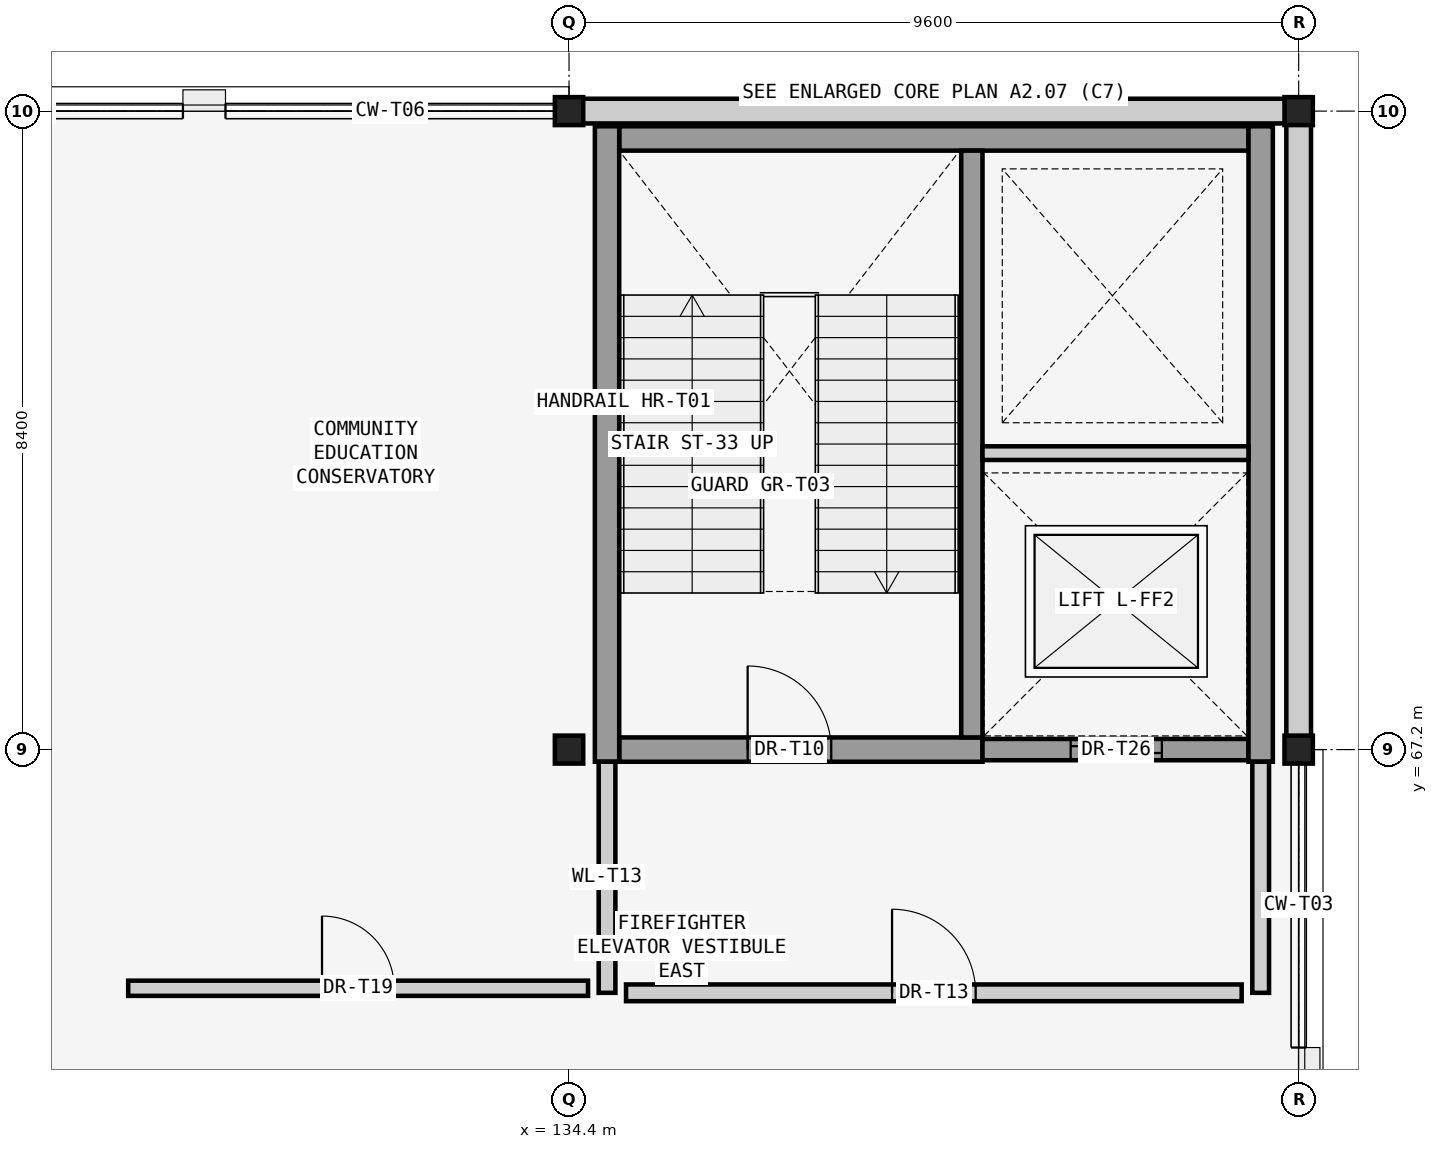
"""IFC4 building model, lengths in metres.
Left out: names, types, materials, properties, quantities, classifications, styles, units other than length and angle.
Written with IfcOpenShell. Run it as: python <this file> out.ifc"""

import sys

from ifc_helpers import new_model, si_unit, direction, frame, frame_2d, origin, origin_2d, place, context, subcontext, project, spatial, rectangle, i_section, extrude, element, fill, save


model = new_model("IFC4")
c1 = context("Model", 3, precision=1e-05, world=origin(), true_north=direction((0.0, 1.0)))
c2 = subcontext(c1, "Body", "Model", "MODEL_VIEW")
j1 = project(units=[si_unit("LENGTHUNIT", "METRE"), si_unit("PLANEANGLEUNIT", "RADIAN")], contexts=[c1])
p1 = place(None, origin())
s1 = spatial("IfcSite", under=j1, at=p1, CompositionType="ELEMENT")
p2 = place(p1, origin())
s2 = spatial("IfcBuilding", under=s1, at=p2, CompositionType="ELEMENT")
p3 = place(p2, frame((0.0, 0.0, 15.0)))
s3 = spatial("IfcBuildingStorey", under=s2, at=p3, CompositionType="ELEMENT", Elevation=15.0)
for number, where, z_axis, x_axis in (
    (1, (134.4, 67.2, 0.0), (0.0, 0.0, 1.0), (1.0, 0.0, 0.0)),
    (2, (134.4, 75.6, 0.0), (0.0, 0.0, 1.0), (1.0, 0.0, 0.0)),
    (3, (144.0, 67.2, 0.0), (0.0, 0.0, 1.0), (1.0, 0.0, 0.0)),
    (4, (144.0, 75.6, 0.0), (0.0, 0.0, 1.0), (1.0, 0.0, 0.0)),
):
    element("IfcColumn", number, at=place(p3, frame(where, z_axis=z_axis, x_axis=x_axis)), inside=s3, PredefinedType="COLUMN", context=c2, shape_type="SweptSolid", body=[
        extrude(i_section(OverallWidth=0.373, OverallDepth=0.368, WebThickness=0.018, FlangeThickness=0.028, at=origin_2d()), origin(), (0.0, 0.0, 1.0), 4.58),
    ])
p4 = place(p3, frame((134.42, 75.6, 0.0), z_axis=(0.0, 0.0, 1.0), x_axis=(1.0, 0.0, 0.0)))
e5 = element("IfcWall", 5, at=p4, inside=s3, PredefinedType="SOLIDWALL", context=c2, shape_type="SweptSolid", body=[
    extrude(rectangle(XDim=9.56, YDim=0.325, at=frame_2d((4.78, 0.0))), origin(), (0.0, 0.0, 1.0), 3.857),
])
p5 = place(p3, frame((144.0, 75.58, 0.0), z_axis=(0.0, 0.0, 1.0), x_axis=(0.0, -1.0, 0.0)))
e6 = element("IfcWall", 6, at=p5, inside=s3, PredefinedType="SOLIDWALL", context=c2, shape_type="SweptSolid", body=[
    extrude(rectangle(XDim=8.36, YDim=0.325, at=frame_2d((4.18, 0.0))), origin(), (0.0, 0.0, 1.0), 4.228),
])
p6 = place(p3, frame((135.06, 67.2, 0.0), z_axis=(0.0, 0.0, 1.0), x_axis=(1.0, 0.0, 0.0)))
e7 = element("IfcWall", 7, at=p6, inside=s3, PredefinedType="SHEAR", context=c2, shape_type="SweptSolid", body=[
    extrude(rectangle(XDim=4.78, YDim=0.32, at=frame_2d((2.39, 0.0))), origin(), (0.0, 0.0, 1.0), 4.56),
])
p7 = place(p6, frame((1.69, 0.0, 0.0)))
e8 = element("IfcOpeningElement", 8, at=p7, cuts=e7, PredefinedType="OPENING", context=c2, shape_type="SweptSolid", body=[
    extrude(rectangle(XDim=1.1, YDim=2.2, at=frame_2d((0.55, 1.1))), frame((0.0, 0.17, 0.0), z_axis=(0.0, -1.0, 0.0), x_axis=(1.0, 0.0, 0.0)), (0.0, 0.0, 1.0), 0.34),
])
p8 = place(p3, frame((139.84, 67.2, 0.0), z_axis=(0.0, 0.0, 1.0), x_axis=(1.0, 0.0, 0.0)))
e9 = element("IfcWall", 9, at=p8, inside=s3, PredefinedType="SHEAR", context=c2, shape_type="SweptSolid", body=[
    extrude(rectangle(XDim=3.5, YDim=0.28, at=frame_2d((1.75, 0.0))), origin(), (0.0, 0.0, 1.0), 4.56),
])
p9 = place(p8, frame((1.16, 0.0, 0.0)))
e10 = element("IfcOpeningElement", 10, at=p9, cuts=e9, PredefinedType="OPENING", context=c2, shape_type="SweptSolid", body=[
    extrude(rectangle(XDim=1.2, YDim=2.2, at=frame_2d((0.6, 1.1))), frame((0.0, 0.15, 0.0), z_axis=(0.0, -1.0, 0.0), x_axis=(1.0, 0.0, 0.0)), (0.0, 0.0, 1.0), 0.3),
])
p10 = place(p3, frame((143.34, 75.24, 0.0), z_axis=(0.0, 0.0, 1.0), x_axis=(-1.0, 0.0, 0.0)))
e11 = element("IfcWall", 11, at=p10, inside=s3, PredefinedType="SHEAR", context=c2, shape_type="SweptSolid", body=[
    extrude(rectangle(XDim=8.28, YDim=0.32, at=frame_2d((4.14, 0.0))), origin(), (0.0, 0.0, 1.0), 4.56),
])
for number, where, z_axis, x_axis in (
    (12, (134.9, 75.4, 0.0), (0.0, 0.0, 1.0), (0.0, -1.0, 0.0)),
    (13, (143.5, 67.04, 0.0), (0.0, 0.0, 1.0), (0.0, 1.0, 0.0)),
):
    element("IfcWall", number, at=place(p3, frame(where, z_axis=z_axis, x_axis=x_axis)), inside=s3, PredefinedType="SHEAR", context=c2, shape_type="SweptSolid", body=[
        extrude(rectangle(XDim=8.36, YDim=0.32, at=frame_2d((4.18, 0.0))), origin(), (0.0, 0.0, 1.0), 4.56),
    ])
p11 = place(p3, frame((139.7, 67.36, 0.0), z_axis=(0.0, 0.0, 1.0), x_axis=(0.0, 1.0, 0.0)))
e14 = element("IfcWall", 14, at=p11, inside=s3, PredefinedType="SHEAR", context=c2, shape_type="SweptSolid", body=[
    extrude(rectangle(XDim=7.72, YDim=0.28, at=frame_2d((3.86, 0.0))), origin(), (0.0, 0.0, 1.0), 4.56),
])
p12 = place(p3, frame((139.84, 71.1, 0.0), z_axis=(0.0, 0.0, 1.0), x_axis=(1.0, 0.0, 0.0)))
e15 = element("IfcWall", 15, at=p12, inside=s3, PredefinedType="SOLIDWALL", context=c2, shape_type="SweptSolid", body=[
    extrude(rectangle(XDim=3.5, YDim=0.18, at=frame_2d((1.75, 0.0))), origin(), (0.0, 0.0, 1.0), 4.56),
])
for number, where, z_axis, x_axis in (
    (16, (134.9, 64.0, 0.0), (0.0, 0.0, 1.0), (0.0, 1.0, 0.0)),
    (17, (143.5, 64.0, 0.0), (0.0, 0.0, 1.0), (0.0, 1.0, 0.0)),
):
    element("IfcWall", number, at=place(p3, frame(where, z_axis=z_axis, x_axis=x_axis)), inside=s3, PredefinedType="SOLIDWALL", context=c2, shape_type="SweptSolid", body=[
        extrude(rectangle(XDim=3.04, YDim=0.22, at=frame_2d((1.52, 0.0))), origin(), (0.0, 0.0, 1.0), 4.32),
    ])
p13 = place(p3, frame((135.15, 64.0, 0.0), z_axis=(0.0, 0.0, 1.0), x_axis=(1.0, 0.0, 0.0)))
e18 = element("IfcWall", 18, at=p13, inside=s3, PredefinedType="SOLIDWALL", context=c2, shape_type="SweptSolid", body=[
    extrude(rectangle(XDim=8.1, YDim=0.22, at=frame_2d((4.05, 0.0))), origin(), (0.0, 0.0, 1.0), 4.32),
])
p14 = place(p13, frame((3.5, 0.0, 0.0)))
e19 = element("IfcOpeningElement", 19, at=p14, cuts=e18, PredefinedType="OPENING", context=c2, shape_type="SweptSolid", body=[
    extrude(rectangle(XDim=1.1, YDim=2.2, at=frame_2d((0.55, 1.1))), frame((0.0, 0.12, 0.0), z_axis=(0.0, -1.0, 0.0), x_axis=(1.0, 0.0, 0.0)), (0.0, 0.0, 1.0), 0.24),
])
p15 = place(p3, frame((128.6, 64.06, 0.0), z_axis=(0.0, 0.0, 1.0), x_axis=(1.0, 0.0, 0.0)))
e20 = element("IfcWall", 20, at=p15, inside=s3, PredefinedType="SOLIDWALL", context=c2, shape_type="SweptSolid", body=[
    extrude(rectangle(XDim=6.05, YDim=0.2, at=frame_2d((3.025, 0.0))), origin(), (0.0, 0.0, 1.0), 4.45),
])
p16 = place(p15, frame((2.55, 0.0, 0.0)))
e21 = element("IfcOpeningElement", 21, at=p16, cuts=e20, PredefinedType="OPENING", context=c2, shape_type="SweptSolid", body=[
    extrude(rectangle(XDim=0.95, YDim=2.15, at=frame_2d((0.475, 1.075))), frame((0.0, 0.11, 0.0), z_axis=(0.0, -1.0, 0.0), x_axis=(1.0, 0.0, 0.0)), (0.0, 0.0, 1.0), 0.22),
])
p17 = place(p7, origin())
e22 = element("IfcDoor", 22, at=p17, inside=s3, OperationType="SINGLE_SWING_LEFT", PredefinedType="DOOR", context=c2, shape_type="SweptSolid", body=[
    extrude(rectangle(XDim=1.1, YDim=2.2, at=frame_2d((0.55, 1.1))), frame((0.0, 0.025, 0.0), z_axis=(0.0, -1.0, 0.0), x_axis=(1.0, 0.0, 0.0)), (0.0, 0.0, 1.0), 0.05),
])
fill(e8, e22)
p18 = place(p9, origin())
e23 = element("IfcDoor", 23, at=p18, inside=s3, OperationType="SLIDING_TO_RIGHT", PredefinedType="DOOR", context=c2, shape_type="SweptSolid", body=[
    extrude(rectangle(XDim=1.2, YDim=2.2, at=frame_2d((0.6, 1.1))), frame((0.0, 0.025, 0.0), z_axis=(0.0, -1.0, 0.0), x_axis=(1.0, 0.0, 0.0)), (0.0, 0.0, 1.0), 0.05),
])
fill(e10, e23)
p19 = place(p14, origin())
e24 = element("IfcDoor", 24, at=p19, inside=s3, OperationType="SINGLE_SWING_LEFT", PredefinedType="DOOR", context=c2, shape_type="SweptSolid", body=[
    extrude(rectangle(XDim=1.1, YDim=2.2, at=frame_2d((0.55, 1.1))), frame((0.0, 0.025, 0.0), z_axis=(0.0, -1.0, 0.0), x_axis=(1.0, 0.0, 0.0)), (0.0, 0.0, 1.0), 0.05),
])
fill(e19, e24)
p20 = place(p16, origin())
e25 = element("IfcDoor", 25, at=p20, inside=s3, OperationType="SINGLE_SWING_LEFT", PredefinedType="DOOR", context=c2, shape_type="SweptSolid", body=[
    extrude(rectangle(XDim=0.95, YDim=2.15, at=frame_2d((0.475, 1.075))), frame((0.0, 0.025, 0.0), z_axis=(0.0, -1.0, 0.0), x_axis=(1.0, 0.0, 0.0)), (0.0, 0.0, 1.0), 0.05),
])
fill(e21, e25)
save(model, sys.argv[1])
